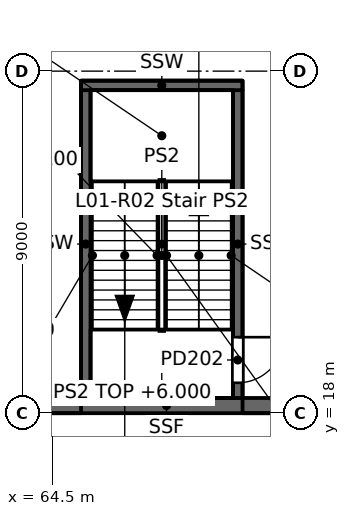
"""IFC4 building model, lengths in metres.
Left out: names, types, materials, properties, quantities, classifications, styles, units other than length and angle.
Written with IfcOpenShell. Run it as: python <this file> out.ifc"""

import sys

from ifc_helpers import new_model, si_unit, direction, frame, frame_2d, origin, place, context, subcontext, project, spatial, rectangle, extrude, element, fill, save


model = new_model("IFC4")
c1 = context("Model", 3, precision=1e-05, world=origin(), true_north=direction((0.0, 1.0)))
c2 = subcontext(c1, "Body", "Model", "MODEL_VIEW")
j1 = project(units=[si_unit("LENGTHUNIT", "METRE"), si_unit("PLANEANGLEUNIT", "RADIAN")], contexts=[c1])
p1 = place(None, origin())
s1 = spatial("IfcSite", under=j1, at=p1, CompositionType="ELEMENT")
p2 = place(p1, origin())
s2 = spatial("IfcBuilding", under=s1, at=p2, CompositionType="ELEMENT")
p3 = place(p2, frame((0.0, 0.0, 6.0)))
s3 = spatial("IfcBuildingStorey", under=s2, at=p3, CompositionType="ELEMENT", Elevation=6.0)
p4 = place(p3, frame((65.375, 18.4, 0.0), z_axis=(0.0, 0.0, 1.0), x_axis=(0.0, 1.0, 0.0)))
e1 = element("IfcWall", 1, at=p4, inside=s3, PredefinedType="SOLIDWALL", context=c2, shape_type="SweptSolid", body=[
    extrude(rectangle(XDim=8.1, YDim=0.25, at=frame_2d((4.05, 0.0))), origin(), (0.0, 0.0, 1.0), 5.4),
])
p5 = place(p3, frame((69.375, 26.5, 0.0), z_axis=(0.0, 0.0, 1.0), x_axis=(0.0, -1.0, 0.0)))
e2 = element("IfcWall", 2, at=p5, inside=s3, PredefinedType="SOLIDWALL", context=c2, shape_type="SweptSolid", body=[
    extrude(rectangle(XDim=8.1, YDim=0.25, at=frame_2d((4.05, 0.0))), origin(), (0.0, 0.0, 1.0), 5.4),
])
p6 = place(p5, frame((6.5, 0.0, 0.0)))
e3 = element("IfcOpeningElement", 3, at=p6, cuts=e2, PredefinedType="OPENING", context=c2, shape_type="SweptSolid", body=[
    extrude(rectangle(XDim=1.2, YDim=2.1, at=frame_2d((0.6, 1.05))), frame((0.0, 0.125, 0.0), z_axis=(0.0, -1.0, 0.0), x_axis=(1.0, 0.0, 0.0)), (0.0, 0.0, 1.0), 0.25),
])
p7 = place(p3, frame((65.25, 26.625, 0.0), z_axis=(0.0, 0.0, 1.0), x_axis=(1.0, 0.0, 0.0)))
e4 = element("IfcWall", 4, at=p7, inside=s3, PredefinedType="SOLIDWALL", context=c2, shape_type="SweptSolid", body=[
    extrude(rectangle(XDim=4.25, YDim=0.25, at=frame_2d((2.125, 0.0))), origin(), (0.0, 0.0, 1.0), 5.4),
])
p8 = place(p3, frame((71.25, 18.2, 0.0), z_axis=(0.0, 0.0, 1.0), x_axis=(-1.0, 0.0, 0.0)))
e5 = element("IfcWall", 5, at=p8, inside=s3, PredefinedType="SOLIDWALL", context=c2, shape_type="SweptSolid", body=[
    extrude(rectangle(XDim=7.5, YDim=0.4, at=frame_2d((3.75, 0.0))), origin(), (0.0, 0.0, 1.0), 5.05),
])
p9 = place(p6, origin())
e6 = element("IfcDoor", 6, at=p9, inside=s3, OperationType="SINGLE_SWING_LEFT", PredefinedType="DOOR", context=c2, shape_type="SweptSolid", body=[
    extrude(rectangle(XDim=1.2, YDim=2.1, at=frame_2d((0.6, 1.05))), frame((0.0, 0.025, 0.0), z_axis=(0.0, -1.0, 0.0), x_axis=(1.0, 0.0, 0.0)), (0.0, 0.0, 1.0), 0.05),
])
fill(e3, e6)
save(model, sys.argv[1])
